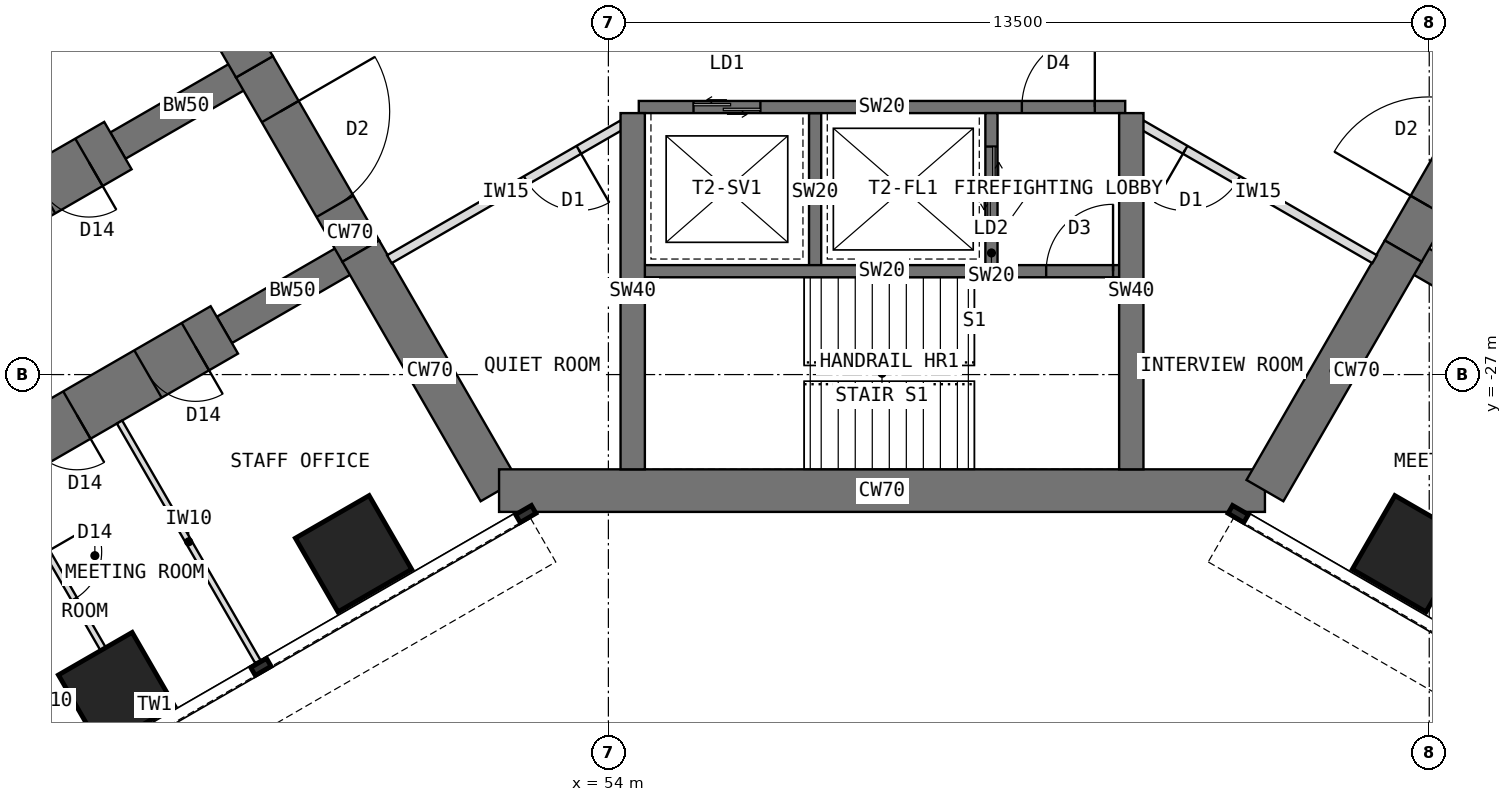
"""IFC4 building model, lengths in metres.
Left out: names, types, materials, properties, quantities, classifications, styles, units other than length and angle.
Written with IfcOpenShell. Run it as: python <this file> out.ifc"""

import sys

from ifc_helpers import new_model, si_unit, direction, frame, frame_2d, origin, origin_2d, place, context, subcontext, project, spatial, rectangle, extrude, element, fill, save


model = new_model("IFC4")
c1 = context("Model", 3, precision=1e-05, world=origin(), true_north=direction((0.0, 1.0)))
c2 = subcontext(c1, "Body", "Model", "MODEL_VIEW")
j1 = project(units=[si_unit("LENGTHUNIT", "METRE"), si_unit("PLANEANGLEUNIT", "RADIAN")], contexts=[c1])
p1 = place(None, origin())
s1 = spatial("IfcSite", under=j1, at=p1, CompositionType="ELEMENT")
p2 = place(p1, origin())
s2 = spatial("IfcBuilding", under=s1, at=p2, CompositionType="ELEMENT")
p3 = place(p2, frame((0.0, 0.0, 84.5)))
s3 = spatial("IfcBuildingStorey", under=s2, at=p3, CompositionType="ELEMENT", Elevation=84.5)
p4 = place(p3, frame((45.904, -18.0, 0.0), z_axis=(0.0, 0.0, 1.0), x_axis=(0.500024481964, -0.866011268655, 0.0)))
e1 = element("IfcWall", 1, at=p4, inside=s3, PredefinedType="SHEAR", context=c2, shape_type="SweptSolid", body=[
    extrude(rectangle(XDim=4.548, YDim=0.7, at=frame_2d((2.274, 0.0))), origin(), (0.0, 0.0, 1.0), 4.0),
])
p5 = place(p3, frame((48.178, -21.939, 0.0), z_axis=(0.0, 0.0, 1.0), x_axis=(0.500010275428, -0.866019471182, 0.0)))
e2 = element("IfcWall", 2, at=p5, inside=s3, PredefinedType="SHEAR", context=c2, shape_type="SweptSolid", body=[
    extrude(rectangle(XDim=3.5, YDim=0.7, at=frame_2d((1.75, 0.0))), origin(), (0.0, 0.0, 1.0), 4.0),
])
p6 = place(p5, frame((0.85, 0.0, 0.0)))
e3 = element("IfcOpeningElement", 3, at=p6, cuts=e2, PredefinedType="OPENING", context=c2, shape_type="SweptSolid", body=[
    extrude(rectangle(XDim=1.8, YDim=2.1, at=frame_2d((0.9, 1.05))), frame((0.0, 0.36, 0.0), z_axis=(0.0, -1.0, 0.0), x_axis=(1.0, 0.0, 0.0)), (0.0, 0.0, 1.0), 0.72),
])
p7 = place(p3, frame((49.928, -24.97, 0.0), z_axis=(0.0, 0.0, 1.0), x_axis=(0.499984222037, -0.866034513004, 0.0)))
e4 = element("IfcWall", 4, at=p7, inside=s3, PredefinedType="SHEAR", context=c2, shape_type="SweptSolid", body=[
    extrude(rectangle(XDim=4.548, YDim=0.7, at=frame_2d((2.274, 0.0))), origin(), (0.0, 0.0, 1.0), 4.0),
])
p8 = place(p3, frame((52.202, -28.908, 0.0), z_axis=(0.0, 0.0, 1.0), x_axis=(1.0, 0.0, 0.0)))
e5 = element("IfcWall", 5, at=p8, inside=s3, PredefinedType="SHEAR", context=c2, shape_type="SweptSolid", body=[
    extrude(rectangle(XDim=12.596, YDim=0.7, at=frame_2d((6.298, 0.0))), origin(), (0.0, 0.0, 1.0), 4.0),
])
p9 = place(p3, frame((64.798, -28.908, 0.0), z_axis=(0.0, 0.0, 1.0), x_axis=(0.499984222037, 0.866034513004, 0.0)))
e6 = element("IfcWall", 6, at=p9, inside=s3, PredefinedType="SHEAR", context=c2, shape_type="SweptSolid", body=[
    extrude(rectangle(XDim=4.548, YDim=0.7, at=frame_2d((2.274, 0.0))), origin(), (0.0, 0.0, 1.0), 4.0),
])
p10 = place(p3, frame((67.072, -24.97, 0.0), z_axis=(0.0, 0.0, 1.0), x_axis=(0.500010275428, 0.866019471182, 0.0)))
e7 = element("IfcWall", 7, at=p10, inside=s3, PredefinedType="SHEAR", context=c2, shape_type="SweptSolid", body=[
    extrude(rectangle(XDim=3.5, YDim=0.7, at=frame_2d((1.75, 0.0))), origin(), (0.0, 0.0, 1.0), 4.0),
])
p11 = place(p10, frame((0.85, 0.0, 0.0)))
e8 = element("IfcOpeningElement", 8, at=p11, cuts=e7, PredefinedType="OPENING", context=c2, shape_type="SweptSolid", body=[
    extrude(rectangle(XDim=1.8, YDim=2.1, at=frame_2d((0.9, 1.05))), frame((0.0, 0.36, 0.0), z_axis=(0.0, -1.0, 0.0), x_axis=(1.0, 0.0, 0.0)), (0.0, 0.0, 1.0), 0.72),
])
p12 = place(p3, frame((49.928, -24.97, 0.0), z_axis=(0.0, 0.0, 1.0), x_axis=(-0.866031863473, -0.499988811324, 0.0)))
e9 = element("IfcWall", 9, at=p12, inside=s3, PredefinedType="SHEAR", context=c2, shape_type="SweptSolid", body=[
    extrude(rectangle(XDim=2.592, YDim=0.5, at=frame_2d((1.296, 0.0))), origin(), (0.0, 0.0, 1.0), 4.0),
])
p13 = place(p3, frame((47.684, -26.266, 0.0), z_axis=(0.0, 0.0, 1.0), x_axis=(-0.866027579429, -0.499996231654, 0.0)))
e10 = element("IfcWall", 10, at=p13, inside=s3, PredefinedType="SHEAR", context=c2, shape_type="SweptSolid", body=[
    extrude(rectangle(XDim=13.2, YDim=0.9, at=frame_2d((6.6, 0.0))), origin(), (0.0, 0.0, 1.0), 4.0),
])
p14 = place(p13, frame((0.55, 0.0, 0.0)))
e11 = element("IfcOpeningElement", 11, at=p14, cuts=e10, PredefinedType="OPENING", context=c2, shape_type="SweptSolid", body=[
    extrude(rectangle(XDim=0.9, YDim=2.1, at=frame_2d((0.45, 1.05))), frame((0.0, 0.46, 0.0), z_axis=(0.0, -1.0, 0.0), x_axis=(1.0, 0.0, 0.0)), (0.0, 0.0, 1.0), 0.92),
])
p15 = place(p13, frame((2.8, 0.0, 0.0)))
e12 = element("IfcOpeningElement", 12, at=p15, cuts=e10, PredefinedType="OPENING", context=c2, shape_type="SweptSolid", body=[
    extrude(rectangle(XDim=0.9, YDim=2.1, at=frame_2d((0.45, 1.05))), frame((0.0, 0.46, 0.0), z_axis=(0.0, -1.0, 0.0), x_axis=(1.0, 0.0, 0.0)), (0.0, 0.0, 1.0), 0.92),
])
p16 = place(p13, frame((7.3, 0.0, 0.0)))
e13 = element("IfcOpeningElement", 13, at=p16, cuts=e10, PredefinedType="OPENING", context=c2, shape_type="SweptSolid", body=[
    extrude(rectangle(XDim=0.9, YDim=2.1, at=frame_2d((0.45, 1.05))), frame((0.0, 0.46, 0.0), z_axis=(0.0, -1.0, 0.0), x_axis=(1.0, 0.0, 0.0)), (0.0, 0.0, 1.0), 0.92),
])
p17 = place(p3, frame((48.178, -21.939, 0.0), z_axis=(0.0, 0.0, 1.0), x_axis=(-0.866072649678, -0.499918158782, 0.0)))
e14 = element("IfcWall", 14, at=p17, inside=s3, PredefinedType="SHEAR", context=c2, shape_type="SweptSolid", body=[
    extrude(rectangle(XDim=2.592, YDim=0.5, at=frame_2d((1.296, 0.0))), origin(), (0.0, 0.0, 1.0), 4.0),
])
p18 = place(p3, frame((45.934, -23.234, 0.0), z_axis=(0.0, 0.0, 1.0), x_axis=(-0.866019570528, -0.500010103361, 0.0)))
e15 = element("IfcWall", 15, at=p18, inside=s3, PredefinedType="SHEAR", context=c2, shape_type="SweptSolid", body=[
    extrude(rectangle(XDim=13.2, YDim=0.9, at=frame_2d((6.6, 0.0))), origin(), (0.0, 0.0, 1.0), 4.0),
])
p19 = place(p18, frame((0.55, 0.0, 0.0)))
e16 = element("IfcOpeningElement", 16, at=p19, cuts=e15, PredefinedType="OPENING", context=c2, shape_type="SweptSolid", body=[
    extrude(rectangle(XDim=0.9, YDim=2.1, at=frame_2d((0.45, 1.05))), frame((0.0, 0.46, 0.0), z_axis=(0.0, -1.0, 0.0), x_axis=(1.0, 0.0, 0.0)), (0.0, 0.0, 1.0), 0.92),
])
p20 = place(p18, frame((2.8, 0.0, 0.0)))
e17 = element("IfcOpeningElement", 17, at=p20, cuts=e15, PredefinedType="OPENING", context=c2, shape_type="SweptSolid", body=[
    extrude(rectangle(XDim=0.9, YDim=2.1, at=frame_2d((0.45, 1.05))), frame((0.0, 0.46, 0.0), z_axis=(0.0, -1.0, 0.0), x_axis=(1.0, 0.0, 0.0)), (0.0, 0.0, 1.0), 0.92),
])
p21 = place(p18, frame((7.3, 0.0, 0.0)))
e18 = element("IfcOpeningElement", 18, at=p21, cuts=e15, PredefinedType="OPENING", context=c2, shape_type="SweptSolid", body=[
    extrude(rectangle(XDim=0.9, YDim=2.1, at=frame_2d((0.45, 1.05))), frame((0.0, 0.46, 0.0), z_axis=(0.0, -1.0, 0.0), x_axis=(1.0, 0.0, 0.0)), (0.0, 0.0, 1.0), 0.92),
])
p22 = place(p3, frame((67.072, -24.97, 0.0), z_axis=(0.0, 0.0, 1.0), x_axis=(0.866031863473, -0.499988811324, 0.0)))
e19 = element("IfcWall", 19, at=p22, inside=s3, PredefinedType="SHEAR", context=c2, shape_type="SweptSolid", body=[
    extrude(rectangle(XDim=2.592, YDim=0.5, at=frame_2d((1.296, 0.0))), origin(), (0.0, 0.0, 1.0), 4.0),
])
for number, where, z_axis, x_axis in (
    (20, (49.809, -29.946, 0.0), (0.0, 0.0, 1.0), (0.866, 0.5, 0.0)),
    (21, (45.912, -32.196, 0.0), (0.0, 0.0, 1.0), (0.866, 0.5, 0.0)),
    (22, (67.191, -29.946, 0.0), (0.0, 0.0, 1.0), (0.5, 0.866, 0.0)),
):
    element("IfcColumn", number, at=place(p3, frame(where, z_axis=z_axis, x_axis=x_axis)), inside=s3, PredefinedType="COLUMN", context=c2, shape_type="SweptSolid", body=[
        extrude(rectangle(XDim=1.4, YDim=1.4, at=origin_2d()), origin(), (0.0, 0.0, 1.0), 4.0),
    ])
p23 = place(p3, frame((54.5, -22.6, 0.0), z_axis=(0.0, 0.0, 1.0), x_axis=(1.0, 0.0, 0.0)))
e23 = element("IfcWall", 23, at=p23, inside=s3, PredefinedType="SHEAR", context=c2, shape_type="SweptSolid", body=[
    extrude(rectangle(XDim=8.0, YDim=0.2, at=frame_2d((4.0, 0.0))), origin(), (0.0, 0.0, 1.0), 4.0),
])
p24 = place(p23, frame((6.3, 0.0, 0.0)))
e24 = element("IfcOpeningElement", 24, at=p24, cuts=e23, PredefinedType="OPENING", context=c2, shape_type="SweptSolid", body=[
    extrude(rectangle(XDim=1.2, YDim=2.1, at=frame_2d((0.6, 1.05))), frame((0.0, 0.11, 0.0), z_axis=(0.0, -1.0, 0.0), x_axis=(1.0, 0.0, 0.0)), (0.0, 0.0, 1.0), 0.22),
])
p25 = place(p23, frame((0.9, 0.0, 0.0)))
e25 = element("IfcOpeningElement", 25, at=p25, cuts=e23, PredefinedType="OPENING", context=c2, shape_type="SweptSolid", body=[
    extrude(rectangle(XDim=1.1, YDim=2.2, at=frame_2d((0.55, 1.1))), frame((0.0, 0.11, 0.0), z_axis=(0.0, -1.0, 0.0), x_axis=(1.0, 0.0, 0.0)), (0.0, 0.0, 1.0), 0.22),
])
p26 = place(p3, frame((57.4, -22.7, 0.0), z_axis=(0.0, 0.0, 1.0), x_axis=(0.0, -1.0, 0.0)))
e26 = element("IfcWall", 26, at=p26, inside=s3, PredefinedType="SHEAR", context=c2, shape_type="SweptSolid", body=[
    extrude(rectangle(XDim=2.6, YDim=0.2, at=frame_2d((1.3, 0.0))), origin(), (0.0, 0.0, 1.0), 4.0),
])
p27 = place(p3, frame((60.3, -22.7, 0.0), z_axis=(0.0, 0.0, 1.0), x_axis=(0.0, -1.0, 0.0)))
e27 = element("IfcWall", 27, at=p27, inside=s3, PredefinedType="SHEAR", context=c2, shape_type="SweptSolid", body=[
    extrude(rectangle(XDim=2.6, YDim=0.2, at=frame_2d((1.3, 0.0))), origin(), (0.0, 0.0, 1.0), 4.0),
])
p28 = place(p27, frame((0.55, 0.0, 0.0)))
e28 = element("IfcOpeningElement", 28, at=p28, cuts=e27, PredefinedType="OPENING", context=c2, shape_type="SweptSolid", body=[
    extrude(rectangle(XDim=1.3, YDim=2.2, at=frame_2d((0.65, 1.1))), frame((0.0, 0.11, 0.0), z_axis=(0.0, -1.0, 0.0), x_axis=(1.0, 0.0, 0.0)), (0.0, 0.0, 1.0), 0.22),
])
p29 = place(p3, frame((54.5, -25.3, 0.0), z_axis=(0.0, 0.0, 1.0), x_axis=(1.0, 0.0, 0.0)))
e29 = element("IfcWall", 29, at=p29, inside=s3, PredefinedType="SHEAR", context=c2, shape_type="SweptSolid", body=[
    extrude(rectangle(XDim=8.0, YDim=0.2, at=frame_2d((4.0, 0.0))), origin(), (0.0, 0.0, 1.0), 4.0),
])
p30 = place(p29, frame((6.7, 0.0, 0.0)))
e30 = element("IfcOpeningElement", 30, at=p30, cuts=e29, PredefinedType="OPENING", context=c2, shape_type="SweptSolid", body=[
    extrude(rectangle(XDim=1.1, YDim=2.1, at=frame_2d((0.55, 1.05))), frame((0.0, 0.11, 0.0), z_axis=(0.0, -1.0, 0.0), x_axis=(1.0, 0.0, 0.0)), (0.0, 0.0, 1.0), 0.22),
])
for number, where, z_axis, x_axis in (
    (31, (62.6, -22.7, 0.0), (0.0, 0.0, 1.0), (0.0, -1.0, 0.0)),
    (32, (54.4, -22.7, 0.0), (0.0, 0.0, 1.0), (0.0, -1.0, 0.0)),
):
    element("IfcWall", number, at=place(p3, frame(where, z_axis=z_axis, x_axis=x_axis)), inside=s3, PredefinedType="SHEAR", context=c2, shape_type="SweptSolid", body=[
        extrude(rectangle(XDim=5.858, YDim=0.4, at=frame_2d((2.929, 0.0))), origin(), (0.0, 0.0, 1.0), 4.0),
    ])
p31 = place(p3, frame((45.96, -27.78, 0.0), z_axis=(0.0, 0.0, 1.0), x_axis=(0.499982560684, -0.866035472144, 0.0)))
e33 = element("IfcWall", 33, at=p31, inside=s3, PredefinedType="PARTITIONING", context=c2, shape_type="SweptSolid", body=[
    extrude(rectangle(XDim=4.55, YDim=0.1, at=frame_2d((2.275, 0.0))), origin(), (0.0, 0.0, 1.0), 3.8),
])
p32 = place(p3, frame((45.842, -31.775, 0.0), z_axis=(0.0, 0.0, 1.0), x_axis=(-0.866006032174, -0.500033551112, 0.0)))
e34 = element("IfcWall", 34, at=p32, inside=s3, PredefinedType="PARTITIONING", context=c2, shape_type="SweptSolid", body=[
    extrude(rectangle(XDim=2.4, YDim=0.1, at=frame_2d((1.2, 0.0))), origin(), (0.0, 0.0, 1.0), 3.8),
])
p33 = place(p3, frame((44.141, -28.83, 0.0), z_axis=(0.0, 0.0, 1.0), x_axis=(0.500062241894, -0.865989465428, 0.0)))
e35 = element("IfcWall", 35, at=p33, inside=s3, PredefinedType="PARTITIONING", context=c2, shape_type="SweptSolid", body=[
    extrude(rectangle(XDim=3.4, YDim=0.1, at=frame_2d((1.7, 0.0))), origin(), (0.0, 0.0, 1.0), 3.8),
])
p34 = place(p33, frame((1.25, 0.0, 0.0)))
e36 = element("IfcOpeningElement", 36, at=p34, cuts=e35, PredefinedType="OPENING", context=c2, shape_type="SweptSolid", body=[
    extrude(rectangle(XDim=0.9, YDim=2.1, at=frame_2d((0.45, 1.05))), frame((0.0, 0.06, 0.0), z_axis=(0.0, -1.0, 0.0), x_axis=(1.0, 0.0, 0.0)), (0.0, 0.0, 1.0), 0.12),
])
p35 = place(p3, frame((66.603, -25.103, 0.0), z_axis=(0.0, 0.0, 1.0), x_axis=(-0.866021148949, 0.500007369519, 0.0)))
e37 = element("IfcWall", 37, at=p35, inside=s3, PredefinedType="PARTITIONING", context=c2, shape_type="SweptSolid", body=[
    extrude(rectangle(XDim=4.426, YDim=0.15, at=frame_2d((2.213, 0.0))), origin(), (0.0, 0.0, 1.0), 3.8),
])
p36 = place(p35, frame((2.598, 0.0, 0.0)))
e38 = element("IfcOpeningElement", 38, at=p36, cuts=e37, PredefinedType="OPENING", context=c2, shape_type="SweptSolid", body=[
    extrude(rectangle(XDim=1.0, YDim=2.1, at=frame_2d((0.5, 1.05))), frame((0.0, 0.085, 0.0), z_axis=(0.0, -1.0, 0.0), x_axis=(1.0, 0.0, 0.0)), (0.0, 0.0, 1.0), 0.17),
])
p37 = place(p3, frame((54.23, -22.89, 0.0), z_axis=(0.0, 0.0, 1.0), x_axis=(-0.866021148949, -0.500007369519, 0.0)))
e39 = element("IfcWall", 39, at=p37, inside=s3, PredefinedType="PARTITIONING", context=c2, shape_type="SweptSolid", body=[
    extrude(rectangle(XDim=4.426, YDim=0.15, at=frame_2d((2.213, 0.0))), origin(), (0.0, 0.0, 1.0), 3.8),
])
p38 = place(p37, frame((0.828, 0.0, 0.0)))
e40 = element("IfcOpeningElement", 40, at=p38, cuts=e39, PredefinedType="OPENING", context=c2, shape_type="SweptSolid", body=[
    extrude(rectangle(XDim=1.0, YDim=2.1, at=frame_2d((0.5, 1.05))), frame((0.0, 0.085, 0.0), z_axis=(0.0, -1.0, 0.0), x_axis=(1.0, 0.0, 0.0)), (0.0, 0.0, 1.0), 0.17),
])
p39 = place(p24, origin())
e41 = element("IfcDoor", 41, at=p39, inside=s3, OperationType="SINGLE_SWING_RIGHT", PredefinedType="DOOR", context=c2, shape_type="SweptSolid", body=[
    extrude(rectangle(XDim=1.2, YDim=2.1, at=frame_2d((0.6, 1.05))), frame((0.0, 0.025, 0.0), z_axis=(0.0, -1.0, 0.0), x_axis=(1.0, 0.0, 0.0)), (0.0, 0.0, 1.0), 0.05),
])
fill(e24, e41)
p40 = place(p28, origin())
e42 = element("IfcDoor", 42, at=p40, inside=s3, OperationType="DOUBLE_DOOR_SLIDING", PredefinedType="DOOR", context=c2, shape_type="SweptSolid", body=[
    extrude(rectangle(XDim=1.3, YDim=2.2, at=frame_2d((0.65, 1.1))), frame((0.0, 0.025, 0.0), z_axis=(0.0, -1.0, 0.0), x_axis=(1.0, 0.0, 0.0)), (0.0, 0.0, 1.0), 0.05),
])
fill(e28, e42)
p41 = place(p25, origin())
e43 = element("IfcDoor", 43, at=p41, inside=s3, OperationType="DOUBLE_DOOR_SLIDING", PredefinedType="DOOR", context=c2, shape_type="SweptSolid", body=[
    extrude(rectangle(XDim=1.1, YDim=2.2, at=frame_2d((0.55, 1.1))), frame((0.0, 0.025, 0.0), z_axis=(0.0, -1.0, 0.0), x_axis=(1.0, 0.0, 0.0)), (0.0, 0.0, 1.0), 0.05),
])
fill(e25, e43)
p42 = place(p30, origin())
e44 = element("IfcDoor", 44, at=p42, inside=s3, OperationType="SINGLE_SWING_RIGHT", PredefinedType="DOOR", context=c2, shape_type="SweptSolid", body=[
    extrude(rectangle(XDim=1.1, YDim=2.1, at=frame_2d((0.55, 1.05))), frame((0.0, 0.025, 0.0), z_axis=(0.0, -1.0, 0.0), x_axis=(1.0, 0.0, 0.0)), (0.0, 0.0, 1.0), 0.05),
])
fill(e30, e44)
p43 = place(p6, origin())
e45 = element("IfcDoor", 45, at=p43, inside=s3, OperationType="DOUBLE_DOOR_DOUBLE_SWING", PredefinedType="DOOR", context=c2, shape_type="SweptSolid", body=[
    extrude(rectangle(XDim=1.72, YDim=2.06, at=frame_2d((0.9, 1.03))), frame((0.0, 0.025, 0.0), z_axis=(0.0, -1.0, 0.0), x_axis=(1.0, 0.0, 0.0)), (0.0, 0.0, 1.0), 0.05),
    extrude(rectangle(XDim=0.04, YDim=2.1, at=frame_2d((0.02, 1.05))), frame((0.0, 0.35, 0.0), z_axis=(0.0, -1.0, 0.0), x_axis=(1.0, 0.0, 0.0)), (0.0, 0.0, 1.0), 0.699),
    extrude(rectangle(XDim=0.04, YDim=2.1, at=frame_2d((1.78, 1.05))), frame((0.0, 0.35, 0.0), z_axis=(0.0, -1.0, 0.0), x_axis=(1.0, 0.0, 0.0)), (0.0, 0.0, 1.0), 0.699),
    extrude(rectangle(XDim=1.72, YDim=0.04, at=frame_2d((0.9, 2.08))), frame((0.0, 0.35, 0.0), z_axis=(0.0, -1.0, 0.0), x_axis=(1.0, 0.0, 0.0)), (0.0, 0.0, 1.0), 0.699),
])
fill(e3, e45)
p44 = place(p11, origin())
e46 = element("IfcDoor", 46, at=p44, inside=s3, OperationType="DOUBLE_DOOR_DOUBLE_SWING", PredefinedType="DOOR", context=c2, shape_type="SweptSolid", body=[
    extrude(rectangle(XDim=1.72, YDim=2.06, at=frame_2d((0.9, 1.03))), frame((0.0, 0.025, 0.0), z_axis=(0.0, -1.0, 0.0), x_axis=(1.0, 0.0, 0.0)), (0.0, 0.0, 1.0), 0.05),
    extrude(rectangle(XDim=0.04, YDim=2.1, at=frame_2d((0.02, 1.05))), frame((0.0, 0.35, 0.0), z_axis=(0.0, -1.0, 0.0), x_axis=(1.0, 0.0, 0.0)), (0.0, 0.0, 1.0), 0.699),
    extrude(rectangle(XDim=0.04, YDim=2.1, at=frame_2d((1.78, 1.05))), frame((0.0, 0.35, 0.0), z_axis=(0.0, -1.0, 0.0), x_axis=(1.0, 0.0, 0.0)), (0.0, 0.0, 1.0), 0.699),
    extrude(rectangle(XDim=1.72, YDim=0.04, at=frame_2d((0.9, 2.08))), frame((0.0, 0.35, 0.0), z_axis=(0.0, -1.0, 0.0), x_axis=(1.0, 0.0, 0.0)), (0.0, 0.0, 1.0), 0.699),
])
fill(e8, e46)
p45 = place(p34, origin())
e47 = element("IfcDoor", 47, at=p45, inside=s3, OperationType="SINGLE_SWING_LEFT", PredefinedType="DOOR", context=c2, shape_type="SweptSolid", body=[
    extrude(rectangle(XDim=0.9, YDim=2.1, at=frame_2d((0.45, 1.05))), frame((0.0, 0.025, 0.0), z_axis=(0.0, -1.0, 0.0), x_axis=(1.0, 0.0, 0.0)), (0.0, 0.0, 1.0), 0.05),
])
fill(e36, e47)
p46 = place(p38, origin())
e48 = element("IfcDoor", 48, at=p46, inside=s3, OperationType="SINGLE_SWING_LEFT", PredefinedType="DOOR", context=c2, shape_type="SweptSolid", body=[
    extrude(rectangle(XDim=1.0, YDim=2.1, at=frame_2d((0.5, 1.05))), frame((0.0, 0.025, 0.0), z_axis=(0.0, -1.0, 0.0), x_axis=(1.0, 0.0, 0.0)), (0.0, 0.0, 1.0), 0.05),
])
fill(e40, e48)
p47 = place(p36, origin())
e49 = element("IfcDoor", 49, at=p47, inside=s3, OperationType="SINGLE_SWING_RIGHT", PredefinedType="DOOR", context=c2, shape_type="SweptSolid", body=[
    extrude(rectangle(XDim=1.0, YDim=2.1, at=frame_2d((0.5, 1.05))), frame((0.0, 0.025, 0.0), z_axis=(0.0, -1.0, 0.0), x_axis=(1.0, 0.0, 0.0)), (0.0, 0.0, 1.0), 0.05),
])
fill(e38, e49)
p48 = place(p14, origin())
e50 = element("IfcDoor", 50, at=p48, inside=s3, OperationType="SINGLE_SWING_LEFT", PredefinedType="DOOR", context=c2, shape_type="SweptSolid", body=[
    extrude(rectangle(XDim=0.82, YDim=2.06, at=frame_2d((0.45, 1.03))), frame((0.0, 0.025, 0.0), z_axis=(0.0, -1.0, 0.0), x_axis=(1.0, 0.0, 0.0)), (0.0, 0.0, 1.0), 0.05),
    extrude(rectangle(XDim=0.04, YDim=2.1, at=frame_2d((0.02, 1.05))), frame((0.0, 0.45, 0.0), z_axis=(0.0, -1.0, 0.0), x_axis=(1.0, 0.0, 0.0)), (0.0, 0.0, 1.0), 0.899),
    extrude(rectangle(XDim=0.04, YDim=2.1, at=frame_2d((0.88, 1.05))), frame((0.0, 0.45, 0.0), z_axis=(0.0, -1.0, 0.0), x_axis=(1.0, 0.0, 0.0)), (0.0, 0.0, 1.0), 0.899),
    extrude(rectangle(XDim=0.82, YDim=0.04, at=frame_2d((0.45, 2.08))), frame((0.0, 0.45, 0.0), z_axis=(0.0, -1.0, 0.0), x_axis=(1.0, 0.0, 0.0)), (0.0, 0.0, 1.0), 0.899),
])
fill(e11, e50)
p49 = place(p15, origin())
e51 = element("IfcDoor", 51, at=p49, inside=s3, OperationType="SINGLE_SWING_LEFT", PredefinedType="DOOR", context=c2, shape_type="SweptSolid", body=[
    extrude(rectangle(XDim=0.82, YDim=2.06, at=frame_2d((0.45, 1.03))), frame((0.0, 0.025, 0.0), z_axis=(0.0, -1.0, 0.0), x_axis=(1.0, 0.0, 0.0)), (0.0, 0.0, 1.0), 0.05),
    extrude(rectangle(XDim=0.04, YDim=2.1, at=frame_2d((0.02, 1.05))), frame((0.0, 0.45, 0.0), z_axis=(0.0, -1.0, 0.0), x_axis=(1.0, 0.0, 0.0)), (0.0, 0.0, 1.0), 0.899),
    extrude(rectangle(XDim=0.04, YDim=2.1, at=frame_2d((0.88, 1.05))), frame((0.0, 0.45, 0.0), z_axis=(0.0, -1.0, 0.0), x_axis=(1.0, 0.0, 0.0)), (0.0, 0.0, 1.0), 0.899),
    extrude(rectangle(XDim=0.82, YDim=0.04, at=frame_2d((0.45, 2.08))), frame((0.0, 0.45, 0.0), z_axis=(0.0, -1.0, 0.0), x_axis=(1.0, 0.0, 0.0)), (0.0, 0.0, 1.0), 0.899),
])
fill(e12, e51)
p50 = place(p19, origin())
e52 = element("IfcDoor", 52, at=p50, inside=s3, OperationType="SINGLE_SWING_LEFT", PredefinedType="DOOR", context=c2, shape_type="SweptSolid", body=[
    extrude(rectangle(XDim=0.82, YDim=2.06, at=frame_2d((0.45, 1.03))), frame((0.0, 0.025, 0.0), z_axis=(0.0, -1.0, 0.0), x_axis=(1.0, 0.0, 0.0)), (0.0, 0.0, 1.0), 0.05),
    extrude(rectangle(XDim=0.04, YDim=2.1, at=frame_2d((0.02, 1.05))), frame((0.0, 0.45, 0.0), z_axis=(0.0, -1.0, 0.0), x_axis=(1.0, 0.0, 0.0)), (0.0, 0.0, 1.0), 0.899),
    extrude(rectangle(XDim=0.04, YDim=2.1, at=frame_2d((0.88, 1.05))), frame((0.0, 0.45, 0.0), z_axis=(0.0, -1.0, 0.0), x_axis=(1.0, 0.0, 0.0)), (0.0, 0.0, 1.0), 0.899),
    extrude(rectangle(XDim=0.82, YDim=0.04, at=frame_2d((0.45, 2.08))), frame((0.0, 0.45, 0.0), z_axis=(0.0, -1.0, 0.0), x_axis=(1.0, 0.0, 0.0)), (0.0, 0.0, 1.0), 0.899),
])
fill(e16, e52)
save(model, sys.argv[1])
